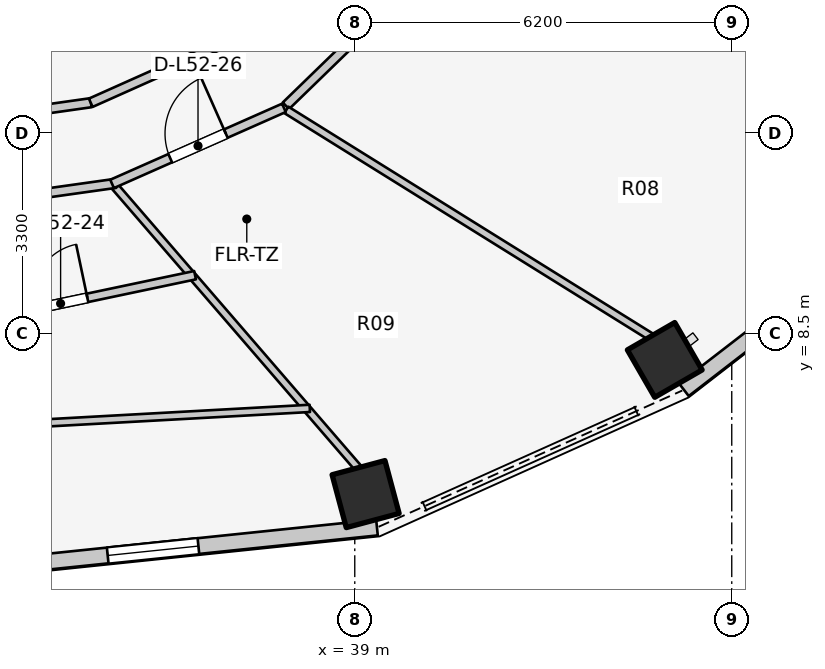
"""IFC4 building model, lengths in metres.
Left out: names, types, materials, properties, quantities, classifications, styles, units other than length and angle.
Written with IfcOpenShell. Run it as: python <this file> out.ifc"""

import sys

from ifc_helpers import new_model, si_unit, direction, frame, frame_2d, origin, origin_2d, place, context, subcontext, project, spatial, rectangle, extrude, element, fill, save


model = new_model("IFC4")
c1 = context("Model", 3, precision=1e-05, world=origin(), true_north=direction((0.0, 1.0)))
c2 = subcontext(c1, "Body", "Model", "MODEL_VIEW")
j1 = project(units=[si_unit("LENGTHUNIT", "METRE"), si_unit("PLANEANGLEUNIT", "RADIAN")], contexts=[c1])
p1 = place(None, origin())
s1 = spatial("IfcSite", under=j1, at=p1, CompositionType="ELEMENT")
p2 = place(p1, origin())
s2 = spatial("IfcBuilding", under=s1, at=p2, CompositionType="ELEMENT")
p3 = place(p2, frame((0.0, 0.0, 171.5)))
s3 = spatial("IfcBuildingStorey", under=s2, at=p3, CompositionType="ELEMENT", Elevation=171.5)
for number, where, z_axis, x_axis in (
    (1, (39.178, 5.865, 0.0), (0.0, 0.0, 1.0), (0.259, -0.966, 0.0)),
    (2, (44.098, 8.072, 0.0), (0.0, 0.0, 1.0), (0.5, -0.866, 0.0)),
):
    element("IfcColumn", number, at=place(p3, frame(where, z_axis=z_axis, x_axis=x_axis)), inside=s3, PredefinedType="COLUMN", context=c2, shape_type="SweptSolid", body=[
        extrude(rectangle(XDim=0.9, YDim=0.9, at=origin_2d()), origin(), (0.0, 0.0, 1.0), 3.1),
    ])
p4 = place(p3, frame((32.0, 4.552, 0.0), z_axis=(0.0, 0.0, 1.0), x_axis=(0.994664178965, 0.10316574569, 0.0)))
e3 = element("IfcWall", 3, at=p4, inside=s3, PredefinedType="STANDARD", context=c2, shape_type="SweptSolid", body=[
    extrude(rectangle(XDim=7.405, YDim=0.26, at=frame_2d((3.702, 0.0))), origin(), (0.0, 0.0, 1.0), 2.85),
])
p5 = place(p4, frame((2.952, 0.0, 0.75)))
e4 = element("IfcOpeningElement", 4, at=p5, cuts=e3, PredefinedType="OPENING", context=c2, shape_type="SweptSolid", body=[
    extrude(rectangle(XDim=1.5, YDim=1.6, at=frame_2d((0.75, 0.8))), frame((0.0, 0.14, 0.0), z_axis=(0.0, -1.0, 0.0), x_axis=(1.0, 0.0, 0.0)), (0.0, 0.0, 1.0), 0.28),
])
p6 = place(p3, frame((44.413, 7.581, 0.0), z_axis=(0.0, 0.0, 1.0), x_axis=(0.791460185804, 0.611220724687, 0.0)))
e5 = element("IfcWall", 5, at=p6, inside=s3, PredefinedType="STANDARD", context=c2, shape_type="SweptSolid", body=[
    extrude(rectangle(XDim=4.872, YDim=0.26, at=frame_2d((2.436, 0.0))), origin(), (0.0, 0.0, 1.0), 2.85),
])
p7 = place(p3, frame((37.867, 12.251, 0.0), z_axis=(0.0, 0.0, 1.0), x_axis=(0.717419568599, 0.696641344302, 0.0)))
e6 = element("IfcWall", 6, at=p7, inside=s3, PredefinedType="PARTITIONING", context=c2, shape_type="SweptSolid", body=[
    extrude(rectangle(XDim=2.138, YDim=0.15, at=frame_2d((1.069, 0.0))), origin(), (0.0, 0.0, 1.0), 2.299),
])
p8 = place(p3, frame((31.998, 11.924, 0.0), z_axis=(0.0, 0.0, 1.0), x_axis=(0.990079774468, 0.140506370634, 0.0)))
e7 = element("IfcWall", 7, at=p8, inside=s3, PredefinedType="PARTITIONING", context=c2, shape_type="SweptSolid", body=[
    extrude(rectangle(XDim=2.69, YDim=0.15, at=frame_2d((1.345, 0.0))), origin(), (0.0, 0.0, 1.0), 2.299),
])
p9 = place(p8, frame((0.87, 0.0, 0.0)))
e8 = element("IfcOpeningElement", 8, at=p9, cuts=e7, PredefinedType="OPENING", context=c2, shape_type="SweptSolid", body=[
    extrude(rectangle(XDim=0.95, YDim=2.1, at=frame_2d((0.475, 1.05))), frame((0.0, 0.085, 0.0), z_axis=(0.0, -1.0, 0.0), x_axis=(1.0, 0.0, 0.0)), (0.0, 0.0, 1.0), 0.17),
])
p10 = place(p3, frame((34.658, 12.301, 0.0), z_axis=(0.0, 0.0, 1.0), x_axis=(0.912985265053, 0.407992531545, 0.0)))
e9 = element("IfcWall", 9, at=p10, inside=s3, PredefinedType="PARTITIONING", context=c2, shape_type="SweptSolid", body=[
    extrude(rectangle(XDim=2.723, YDim=0.15, at=frame_2d((1.362, 0.0))), origin(), (0.0, 0.0, 1.0), 2.299),
])
p11 = place(p3, frame((35.053, 10.927, 0.0), z_axis=(0.0, 0.0, 1.0), x_axis=(0.653779283332, -0.756685303601, 0.0)))
e10 = element("IfcWall", 10, at=p11, inside=s3, PredefinedType="PARTITIONING", context=c2, shape_type="SweptSolid", body=[
    extrude(rectangle(XDim=6.14, YDim=0.125, at=frame_2d((3.07, 0.0))), origin(), (0.0, 0.0, 1.0), 2.299),
])
p12 = place(p3, frame((37.875, 12.184, 0.0), z_axis=(0.0, 0.0, 1.0), x_axis=(0.849008457073, -0.528379257559, 0.0)))
e11 = element("IfcWall", 11, at=p12, inside=s3, PredefinedType="PARTITIONING", context=c2, shape_type="SweptSolid", body=[
    extrude(rectangle(XDim=7.077, YDim=0.125, at=frame_2d((3.539, 0.0))), origin(), (0.0, 0.0, 1.0), 2.299),
])
p13 = place(p3, frame((31.99, 6.929, 0.0), z_axis=(0.0, 0.0, 1.0), x_axis=(0.998481453555, 0.055088900038, 0.0)))
e12 = element("IfcWall", 12, at=p13, inside=s3, PredefinedType="MOVABLE", context=c2, shape_type="SweptSolid", body=[
    extrude(rectangle(XDim=6.28, YDim=0.12, at=frame_2d((3.14, 0.0))), origin(), (0.0, 0.0, 1.0), 2.299),
])
p14 = place(p3, frame((31.95, 10.537, 0.0), z_axis=(0.0, 0.0, 1.0), x_axis=(0.990254405439, 0.139270285808, 0.0)))
e13 = element("IfcWall", 13, at=p14, inside=s3, PredefinedType="PARTITIONING", context=c2, shape_type="SweptSolid", body=[
    extrude(rectangle(XDim=3.147, YDim=0.15, at=frame_2d((1.573, 0.0))), origin(), (0.0, 0.0, 1.0), 2.299),
])
p15 = place(p3, frame((31.951, 8.534, 0.0), z_axis=(0.0, 0.0, 1.0), x_axis=(0.97851996891, 0.206152056609, 0.0)))
e14 = element("IfcWall", 14, at=p15, inside=s3, PredefinedType="PLUMBINGWALL", context=c2, shape_type="SweptSolid", body=[
    extrude(rectangle(XDim=4.519, YDim=0.14, at=frame_2d((2.26, 0.0))), origin(), (0.0, 0.0, 1.0), 2.299),
])
p16 = place(p15, frame((1.81, 0.0, 0.0)))
e15 = element("IfcOpeningElement", 15, at=p16, cuts=e14, PredefinedType="OPENING", context=c2, shape_type="SweptSolid", body=[
    extrude(rectangle(XDim=0.9, YDim=2.1, at=frame_2d((0.45, 1.05))), frame((0.0, 0.08, 0.0), z_axis=(0.0, -1.0, 0.0), x_axis=(1.0, 0.0, 0.0)), (0.0, 0.0, 1.0), 0.16),
])
p17 = place(p3, frame((35.009, 10.966, 0.0), z_axis=(0.0, 0.0, 1.0), x_axis=(0.91445214467, 0.404694051239, 0.0)))
e16 = element("IfcWall", 16, at=p17, inside=s3, PredefinedType="PARTITIONING", context=c2, shape_type="SweptSolid", body=[
    extrude(rectangle(XDim=3.091, YDim=0.15, at=frame_2d((1.545, 0.0))), origin(), (0.0, 0.0, 1.0), 2.299),
])
p18 = place(p17, frame((1.045, 0.0, 0.0)))
e17 = element("IfcOpeningElement", 17, at=p18, cuts=e16, PredefinedType="OPENING", context=c2, shape_type="SweptSolid", body=[
    extrude(rectangle(XDim=1.0, YDim=2.1, at=frame_2d((0.5, 1.05))), frame((0.0, 0.085, 0.0), z_axis=(0.0, -1.0, 0.0), x_axis=(1.0, 0.0, 0.0)), (0.0, 0.0, 1.0), 0.17),
])
p19 = place(p5, origin())
e18 = element("IfcWindow", 18, at=p19, inside=s3, PartitioningType="SINGLE_PANEL", PredefinedType="WINDOW", context=c2, shape_type="SweptSolid", body=[
    extrude(rectangle(XDim=1.5, YDim=1.6, at=frame_2d((0.75, 0.8))), frame((0.0, 0.03, 0.0), z_axis=(0.0, -1.0, 0.0), x_axis=(1.0, 0.0, 0.0)), (0.0, 0.0, 1.0), 0.06),
])
fill(e4, e18)
p20 = place(p16, origin())
e19 = element("IfcDoor", 19, at=p20, inside=s3, OperationType="SINGLE_SWING_RIGHT", PredefinedType="DOOR", context=c2, shape_type="SweptSolid", body=[
    extrude(rectangle(XDim=0.9, YDim=2.1, at=frame_2d((0.45, 1.05))), frame((0.0, 0.025, 0.0), z_axis=(0.0, -1.0, 0.0), x_axis=(1.0, 0.0, 0.0)), (0.0, 0.0, 1.0), 0.05),
])
fill(e15, e19)
p21 = place(p18, origin())
e20 = element("IfcDoor", 20, at=p21, inside=s3, OperationType="SINGLE_SWING_RIGHT", PredefinedType="DOOR", context=c2, shape_type="SweptSolid", body=[
    extrude(rectangle(XDim=1.0, YDim=2.1, at=frame_2d((0.5, 1.05))), frame((0.0, 0.025, 0.0), z_axis=(0.0, -1.0, 0.0), x_axis=(1.0, 0.0, 0.0)), (0.0, 0.0, 1.0), 0.05),
])
fill(e17, e20)
save(model, sys.argv[1])
